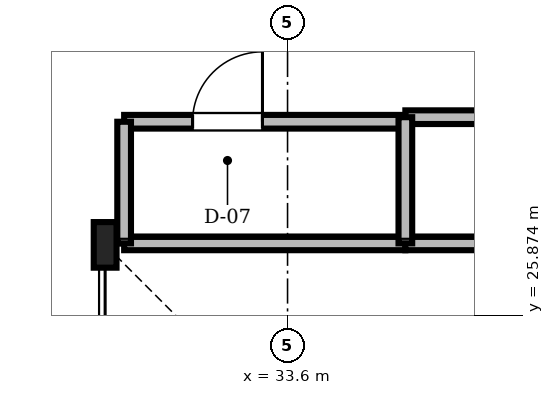
"""IFC4 building model, lengths in metres.
Left out: names, types, materials, properties, quantities, classifications, styles, units other than length and angle.
Written with IfcOpenShell. Run it as: python <this file> out.ifc"""

import sys

from ifc_helpers import new_model, si_unit, direction, frame, frame_2d, origin, origin_2d, place, context, subcontext, project, spatial, rectangle, i_section, extrude, source, transform, mapped, element, fill, save


model = new_model("IFC4")
c1 = context("Model", 3, precision=1e-05, world=origin(), true_north=direction((0.0, 1.0)))
c2 = subcontext(c1, "Body", "Model", "MODEL_VIEW")
j1 = project(units=[si_unit("LENGTHUNIT", "METRE"), si_unit("PLANEANGLEUNIT", "RADIAN")], contexts=[c1])
p1 = place(None, origin())
s1 = spatial("IfcSite", under=j1, at=p1, CompositionType="ELEMENT")
p2 = place(p1, origin())
s2 = spatial("IfcBuilding", under=s1, at=p2, CompositionType="ELEMENT")
p3 = place(p2, frame((0.0, 0.0, 266.4)))
s3 = spatial("IfcBuildingStorey", under=s2, at=p3, CompositionType="ELEMENT", Elevation=266.4)
m1 = source(origin(), c2, "Body", "SweptSolid", [
    extrude(i_section(OverallWidth=0.3, OverallDepth=0.6, WebThickness=0.015, FlangeThickness=0.03, FilletRadius=0.027, at=origin_2d()), origin(), (0.0, 0.0, 1.0), 3.65),
])
p4 = place(p3, frame((31.2, 26.8, 0.0), z_axis=(0.0, 0.0, 1.0), x_axis=(1.0, 0.0, 0.0)))
e1 = element("IfcColumn", 1, at=p4, inside=s3, PredefinedType="COLUMN", context=c2, shape_type="MappedRepresentation", body=[
    mapped(m1, transform((0.0, 0.0, 0.0), scale=1.0)),
])
m2 = source(origin(), c2, "Body", "SweptSolid", [
    extrude(rectangle(XDim=3.7, YDim=0.18, at=frame_2d((1.85, 0.0))), origin(), (0.0, 0.0, 1.0), 3.282),
])
p5 = place(p3, frame((31.45, 28.42, 0.0), z_axis=(0.0, 0.0, 1.0), x_axis=(1.0, 0.0, 0.0)))
e2 = element("IfcWall", 2, at=p5, inside=s3, PredefinedType="PARTITIONING", context=c2, shape_type="MappedRepresentation", body=[
    mapped(m2, transform((0.0, 0.0, 0.0), scale=1.0)),
])
m3 = source(origin(), c2, "Body", "SweptSolid", [
    extrude(rectangle(XDim=0.92, YDim=2.1, at=frame_2d((0.46, 1.05))), frame((0.0, 0.1, 0.0), z_axis=(0.0, -1.0, 0.0), x_axis=(1.0, 0.0, 0.0)), (0.0, 0.0, 1.0), 0.2),
])
p6 = place(p5, frame((0.9, 0.0, 0.0)))
e3 = element("IfcOpeningElement", 3, at=p6, cuts=e2, PredefinedType="OPENING", context=c2, shape_type="MappedRepresentation", body=[
    mapped(m3, transform((0.0, 0.0, 0.0), scale=1.0)),
])
m4 = source(origin(), c2, "Body", "SweptSolid", [
    extrude(rectangle(XDim=3.37, YDim=0.18, at=frame_2d((1.685, 0.0))), origin(), (0.0, 0.0, 1.0), 3.65),
])
p7 = place(p3, frame((35.15, 28.48, 0.0), z_axis=(0.0, 0.0, 1.0), x_axis=(1.0, 0.0, 0.0)))
e4 = element("IfcWall", 4, at=p7, inside=s3, PredefinedType="PARTITIONING", context=c2, shape_type="MappedRepresentation", body=[
    mapped(m4, transform((0.0, 0.0, 0.0), scale=1.0)),
])
m5 = source(origin(), c2, "Body", "SweptSolid", [
    extrude(rectangle(XDim=0.95, YDim=2.15, at=frame_2d((0.475, 1.075))), frame((0.0, 0.1, 0.0), z_axis=(0.0, -1.0, 0.0), x_axis=(1.0, 0.0, 0.0)), (0.0, 0.0, 1.0), 0.2),
])
p8 = place(p7, frame((1.775, 0.0, 0.0)))
e5 = element("IfcOpeningElement", 5, at=p8, cuts=e4, PredefinedType="OPENING", context=c2, shape_type="MappedRepresentation", body=[
    mapped(m5, transform((0.0, 0.0, 0.0), scale=1.0)),
])
m6 = source(origin(), c2, "Body", "SweptSolid", [
    extrude(rectangle(XDim=3.7, YDim=0.18, at=frame_2d((1.85, 0.0))), origin(), (0.0, 0.0, 1.0), 3.192),
])
p9 = place(p3, frame((31.45, 26.82, 0.0), z_axis=(0.0, 0.0, 1.0), x_axis=(1.0, 0.0, 0.0)))
e6 = element("IfcWall", 6, at=p9, inside=s3, PredefinedType="PARTITIONING", context=c2, shape_type="MappedRepresentation", body=[
    mapped(m6, transform((0.0, 0.0, 0.0), scale=1.0)),
])
m7 = source(origin(), c2, "Body", "SweptSolid", [
    extrude(rectangle(XDim=3.37, YDim=0.18, at=frame_2d((1.685, 0.0))), origin(), (0.0, 0.0, 1.0), 3.192),
])
p10 = place(p3, frame((35.15, 26.82, 0.0), z_axis=(0.0, 0.0, 1.0), x_axis=(1.0, 0.0, 0.0)))
e7 = element("IfcWall", 7, at=p10, inside=s3, PredefinedType="PARTITIONING", context=c2, shape_type="MappedRepresentation", body=[
    mapped(m7, transform((0.0, 0.0, 0.0), scale=1.0)),
])
m8 = source(origin(), c2, "Body", "SweptSolid", [
    extrude(rectangle(XDim=1.66, YDim=0.18, at=frame_2d((0.83, 0.0))), origin(), (0.0, 0.0, 1.0), 3.192),
])
p11 = place(p3, frame((35.15, 26.82, 0.0), z_axis=(0.0, 0.0, 1.0), x_axis=(0.0, 1.0, 0.0)))
e8 = element("IfcWall", 8, at=p11, inside=s3, PredefinedType="PARTITIONING", context=c2, shape_type="MappedRepresentation", body=[
    mapped(m8, transform((0.0, 0.0, 0.0), scale=1.0)),
])
m9 = source(origin(), c2, "Body", "SweptSolid", [
    extrude(rectangle(XDim=1.6, YDim=0.18, at=frame_2d((0.8, 0.0))), origin(), (0.0, 0.0, 1.0), 3.192),
])
p12 = place(p3, frame((31.45, 26.82, 0.0), z_axis=(0.0, 0.0, 1.0), x_axis=(0.0, 1.0, 0.0)))
e9 = element("IfcWall", 9, at=p12, inside=s3, PredefinedType="PARTITIONING", context=c2, shape_type="MappedRepresentation", body=[
    mapped(m9, transform((0.0, 0.0, 0.0), scale=1.0)),
])
m10 = source(origin(), c2, "Body", "SweptSolid", [
    extrude(rectangle(XDim=0.92, YDim=2.1, at=frame_2d((0.46, 1.05))), frame((0.0, 0.025, 0.0), z_axis=(0.0, -1.0, 0.0), x_axis=(1.0, 0.0, 0.0)), (0.0, 0.0, 1.0), 0.05),
])
p13 = place(p6, origin())
e10 = element("IfcDoor", 10, at=p13, inside=s3, OperationType="SINGLE_SWING_RIGHT", PredefinedType="DOOR", context=c2, shape_type="MappedRepresentation", body=[
    mapped(m10, transform((0.0, 0.0, 0.0), scale=1.0)),
])
fill(e3, e10)
save(model, sys.argv[1])
